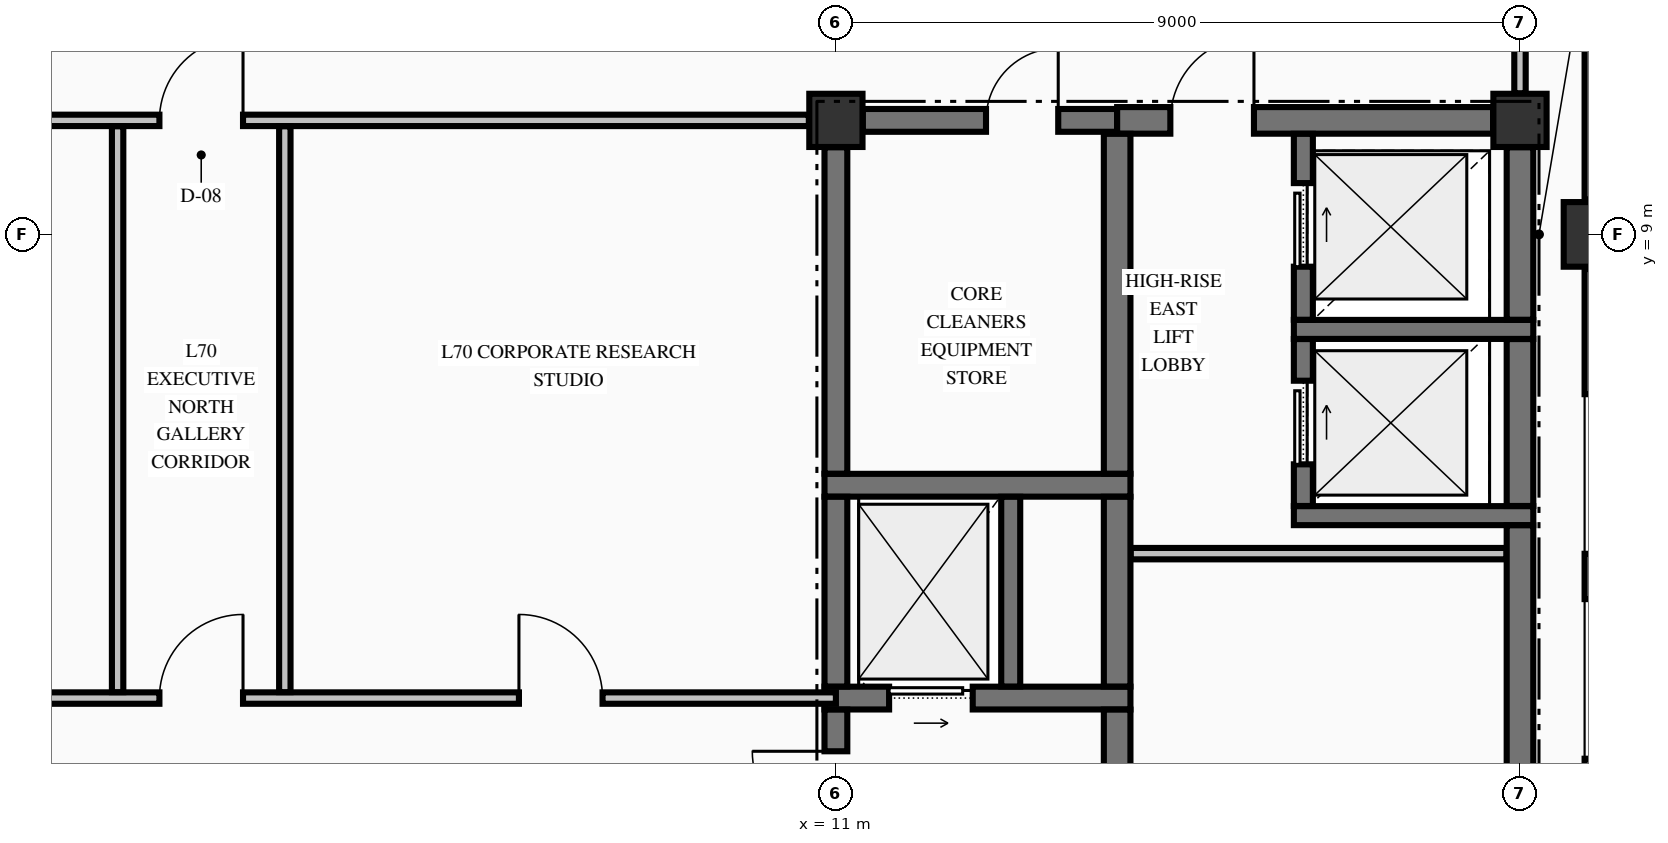
"""IFC4 building model, lengths in metres.
Left out: names, types, materials, properties, quantities, classifications, styles, units other than length and angle.
Written with IfcOpenShell. Run it as: python <this file> out.ifc"""

import sys

from ifc_helpers import new_model, si_unit, direction, frame, frame_2d, origin, origin_2d, place, context, subcontext, project, spatial, rectangle, extrude, element, fill, save


model = new_model("IFC4")
c1 = context("Model", 3, precision=1e-05, world=origin(), true_north=direction((0.0, 1.0)))
c2 = subcontext(c1, "Body", "Model", "MODEL_VIEW")
j1 = project(units=[si_unit("LENGTHUNIT", "METRE"), si_unit("PLANEANGLEUNIT", "RADIAN")], contexts=[c1])
p1 = place(None, origin())
s1 = spatial("IfcSite", under=j1, at=p1, CompositionType="ELEMENT")
p2 = place(p1, origin())
s2 = spatial("IfcBuilding", under=s1, at=p2, CompositionType="ELEMENT")
p3 = place(p2, frame((0.0, 0.0, 264.12)))
s3 = spatial("IfcBuildingStorey", under=s2, at=p3, CompositionType="ELEMENT", Elevation=264.12)
p4 = place(p3, frame((21.0, 9.0, -0.25), z_axis=(0.0, 0.0, 1.0), x_axis=(1.0, 0.0, 0.0)))
e1 = element("IfcColumn", 1, at=p4, inside=s3, PredefinedType="COLUMN", context=c2, shape_type="SweptSolid", body=[
    extrude(rectangle(XDim=0.85, YDim=0.85, at=origin_2d()), origin(), (0.0, 0.0, 1.0), 3.23),
])
for number, where, z_axis, x_axis in (
    (2, (11.0, 10.5, -0.25), (0.0, 0.0, 1.0), (1.0, 0.0, 0.0)),
    (3, (20.0, 10.5, -0.25), (0.0, 0.0, 1.0), (1.0, 0.0, 0.0)),
):
    element("IfcColumn", number, at=place(p3, frame(where, z_axis=z_axis, x_axis=x_axis)), inside=s3, PredefinedType="COLUMN", context=c2, shape_type="SweptSolid", body=[
        extrude(rectangle(XDim=0.7, YDim=0.7, at=origin_2d()), origin(), (0.0, 0.0, 1.0), 3.23),
    ])
p5 = place(p3, frame((21.0, 0.455, 0.0), z_axis=(0.0, 0.0, 1.0), x_axis=(0.0, 1.0, 0.0)))
e4 = element("IfcWall", 4, at=p5, inside=s3, PredefinedType="STANDARD", context=c2, shape_type="SweptSolid", body=[
    extrude(rectangle(XDim=8.09, YDim=0.3, at=frame_2d((4.045, 0.0))), origin(), (0.0, 0.0, 1.0), 2.372),
])
p6 = place(p5, frame((1.647, 0.0, 0.7)))
e5 = element("IfcOpeningElement", 5, at=p6, cuts=e4, PredefinedType="OPENING", context=c2, shape_type="SweptSolid", body=[
    extrude(rectangle(XDim=2.1, YDim=1.5, at=frame_2d((1.05, 0.75))), frame((0.0, 0.16, 0.0), z_axis=(0.0, -1.0, 0.0), x_axis=(1.0, 0.0, 0.0)), (0.0, 0.0, 1.0), 0.32),
])
p7 = place(p5, frame((4.343, 0.0, 0.7)))
e6 = element("IfcOpeningElement", 6, at=p7, cuts=e4, PredefinedType="OPENING", context=c2, shape_type="SweptSolid", body=[
    extrude(rectangle(XDim=2.1, YDim=1.5, at=frame_2d((1.05, 0.75))), frame((0.0, 0.16, 0.0), z_axis=(0.0, -1.0, 0.0), x_axis=(1.0, 0.0, 0.0)), (0.0, 0.0, 1.0), 0.32),
])
p8 = place(p3, frame((21.0, 9.455, 0.0), z_axis=(0.0, 0.0, 1.0), x_axis=(0.0, 1.0, 0.0)))
e7 = element("IfcWall", 7, at=p8, inside=s3, PredefinedType="STANDARD", context=c2, shape_type="SweptSolid", body=[
    extrude(rectangle(XDim=8.09, YDim=0.3, at=frame_2d((4.045, 0.0))), origin(), (0.0, 0.0, 1.0), 2.372),
])
p9 = place(p3, frame((10.85, 2.9, 0.0), z_axis=(0.0, 0.0, 1.0), x_axis=(1.0, 0.0, 0.0)))
e8 = element("IfcWall", 8, at=p9, inside=s3, PredefinedType="SHEAR", context=c2, shape_type="SweptSolid", body=[
    extrude(rectangle(XDim=4.025, YDim=0.3, at=frame_2d((2.012, 0.0))), origin(), (0.0, 0.0, 1.0), 2.98),
])
p10 = place(p9, frame((0.85, 0.0, 0.0)))
e9 = element("IfcOpeningElement", 9, at=p10, cuts=e8, PredefinedType="OPENING", context=c2, shape_type="SweptSolid", body=[
    extrude(rectangle(XDim=1.1, YDim=2.2, at=frame_2d((0.55, 1.1))), frame((0.0, 0.16, 0.0), z_axis=(0.0, -1.0, 0.0), x_axis=(1.0, 0.0, 0.0)), (0.0, 0.0, 1.0), 0.32),
])
p11 = place(p3, frame((17.025, 5.3, 0.0), z_axis=(0.0, 0.0, 1.0), x_axis=(1.0, 0.0, 0.0)))
e10 = element("IfcWall", 10, at=p11, inside=s3, PredefinedType="SOLIDWALL", context=c2, shape_type="SweptSolid", body=[
    extrude(rectangle(XDim=3.15, YDim=0.25, at=frame_2d((1.575, 0.0))), origin(), (0.0, 0.0, 1.0), 2.98),
])
p12 = place(p3, frame((10.85, 5.7, 0.0), z_axis=(0.0, 0.0, 1.0), x_axis=(1.0, 0.0, 0.0)))
e11 = element("IfcWall", 11, at=p12, inside=s3, PredefinedType="SHEAR", context=c2, shape_type="SweptSolid", body=[
    extrude(rectangle(XDim=4.025, YDim=0.3, at=frame_2d((2.012, 0.0))), origin(), (0.0, 0.0, 1.0), 2.98),
])
p13 = place(p3, frame((17.025, 7.75, 0.0), z_axis=(0.0, 0.0, 1.0), x_axis=(1.0, 0.0, 0.0)))
e12 = element("IfcWall", 12, at=p13, inside=s3, PredefinedType="SOLIDWALL", context=c2, shape_type="SweptSolid", body=[
    extrude(rectangle(XDim=3.15, YDim=0.25, at=frame_2d((1.575, 0.0))), origin(), (0.0, 0.0, 1.0), 2.98),
])
p14 = place(p3, frame((11.354, 10.5, 0.0), z_axis=(0.0, 0.0, 1.0), x_axis=(1.0, 0.0, 0.0)))
e13 = element("IfcWall", 13, at=p14, inside=s3, PredefinedType="SHEAR", context=c2, shape_type="SweptSolid", body=[
    extrude(rectangle(XDim=3.346, YDim=0.3, at=frame_2d((1.673, 0.0))), origin(), (0.0, 0.0, 1.0), 2.98),
])
p15 = place(p14, frame((1.621, 0.0, 0.0)))
e14 = element("IfcOpeningElement", 14, at=p15, cuts=e13, PredefinedType="OPENING", context=c2, shape_type="SweptSolid", body=[
    extrude(rectangle(XDim=0.95, YDim=2.15, at=frame_2d((0.475, 1.075))), frame((0.0, 0.16, 0.0), z_axis=(0.0, -1.0, 0.0), x_axis=(1.0, 0.0, 0.0)), (0.0, 0.0, 1.0), 0.32),
])
p16 = place(p3, frame((14.7, 10.5, 0.0), z_axis=(0.0, 0.0, 1.0), x_axis=(1.0, 0.0, 0.0)))
e15 = element("IfcWall", 15, at=p16, inside=s3, PredefinedType="SHEAR", context=c2, shape_type="SweptSolid", body=[
    extrude(rectangle(XDim=4.946, YDim=0.35, at=frame_2d((2.473, 0.0))), origin(), (0.0, 0.0, 1.0), 2.98),
])
p17 = place(p16, frame((0.7, 0.0, 0.0)))
e16 = element("IfcOpeningElement", 16, at=p17, cuts=e15, PredefinedType="OPENING", context=c2, shape_type="SweptSolid", body=[
    extrude(rectangle(XDim=1.1, YDim=2.15, at=frame_2d((0.55, 1.075))), frame((0.0, 0.185, 0.0), z_axis=(0.0, -1.0, 0.0), x_axis=(1.0, 0.0, 0.0)), (0.0, 0.0, 1.0), 0.37),
])
p18 = place(p3, frame((-11.0, 2.9, 0.0), z_axis=(0.0, 0.0, 1.0), x_axis=(1.0, 0.0, 0.0)))
e17 = element("IfcWall", 17, at=p18, inside=s3, PredefinedType="PARTITIONING", context=c2, shape_type="SweptSolid", body=[
    extrude(rectangle(XDim=22.0, YDim=0.15, at=frame_2d((11.0, 0.0))), origin(), (0.0, 0.0, 1.0), 2.98),
])
p19 = place(p18, frame((13.1, 0.0, 0.0)))
e18 = element("IfcOpeningElement", 18, at=p19, cuts=e17, PredefinedType="OPENING", context=c2, shape_type="SweptSolid", body=[
    extrude(rectangle(XDim=1.1, YDim=2.15, at=frame_2d((0.55, 1.075))), frame((0.0, 0.085, 0.0), z_axis=(0.0, -1.0, 0.0), x_axis=(1.0, 0.0, 0.0)), (0.0, 0.0, 1.0), 0.17),
])
p20 = place(p18, frame((5.755, 0.0, 0.0)))
e19 = element("IfcOpeningElement", 19, at=p20, cuts=e17, PredefinedType="OPENING", context=c2, shape_type="SweptSolid", body=[
    extrude(rectangle(XDim=1.05, YDim=2.15, at=frame_2d((0.525, 1.075))), frame((0.0, 0.085, 0.0), z_axis=(0.0, -1.0, 0.0), x_axis=(1.0, 0.0, 0.0)), (0.0, 0.0, 1.0), 0.17),
])
p21 = place(p18, frame((17.83, 0.0, 0.0)))
e20 = element("IfcOpeningElement", 20, at=p21, cuts=e17, PredefinedType="OPENING", context=c2, shape_type="SweptSolid", body=[
    extrude(rectangle(XDim=1.1, YDim=2.15, at=frame_2d((0.55, 1.075))), frame((0.0, 0.085, 0.0), z_axis=(0.0, -1.0, 0.0), x_axis=(1.0, 0.0, 0.0)), (0.0, 0.0, 1.0), 0.17),
])
p22 = place(p3, frame((14.878, 4.8, 0.0), z_axis=(0.0, 0.0, 1.0), x_axis=(1.0, 0.0, 0.0)))
e21 = element("IfcWall", 21, at=p22, inside=s3, PredefinedType="PARTITIONING", context=c2, shape_type="SweptSolid", body=[
    extrude(rectangle(XDim=4.944, YDim=0.15, at=frame_2d((2.472, 0.0))), origin(), (0.0, 0.0, 1.0), 2.98),
])
p23 = place(p3, frame((-10.644, 10.5, 0.0), z_axis=(0.0, 0.0, 1.0), x_axis=(1.0, 0.0, 0.0)))
e22 = element("IfcWall", 22, at=p23, inside=s3, PredefinedType="PARTITIONING", context=c2, shape_type="SweptSolid", body=[
    extrude(rectangle(XDim=21.288, YDim=0.15, at=frame_2d((10.644, 0.0))), origin(), (0.0, 0.0, 1.0), 2.98),
])
p24 = place(p23, frame((12.744, 0.0, 0.0)))
e23 = element("IfcOpeningElement", 23, at=p24, cuts=e22, PredefinedType="OPENING", context=c2, shape_type="SweptSolid", body=[
    extrude(rectangle(XDim=1.1, YDim=2.15, at=frame_2d((0.55, 1.075))), frame((0.0, 0.085, 0.0), z_axis=(0.0, -1.0, 0.0), x_axis=(1.0, 0.0, 0.0)), (0.0, 0.0, 1.0), 0.17),
])
p25 = place(p3, frame((11.0, 0.354, 0.0), z_axis=(0.0, 0.0, 1.0), x_axis=(0.0, 1.0, 0.0)))
e24 = element("IfcWall", 24, at=p25, inside=s3, PredefinedType="SHEAR", context=c2, shape_type="SweptSolid", body=[
    extrude(rectangle(XDim=2.394, YDim=0.3, at=frame_2d((1.197, 0.0))), origin(), (0.0, 0.0, 1.0), 2.98),
])
p26 = place(p25, frame((0.746, 0.0, 0.0)))
e25 = element("IfcOpeningElement", 25, at=p26, cuts=e24, PredefinedType="OPENING", context=c2, shape_type="SweptSolid", body=[
    extrude(rectangle(XDim=1.1, YDim=2.15, at=frame_2d((0.55, 1.075))), frame((0.0, 0.16, 0.0), z_axis=(0.0, -1.0, 0.0), x_axis=(1.0, 0.0, 0.0)), (0.0, 0.0, 1.0), 0.32),
])
p27 = place(p3, frame((11.0, 3.052, 0.0), z_axis=(0.0, 0.0, 1.0), x_axis=(0.0, 1.0, 0.0)))
e26 = element("IfcWall", 26, at=p27, inside=s3, PredefinedType="SHEAR", context=c2, shape_type="SweptSolid", body=[
    extrude(rectangle(XDim=2.496, YDim=0.3, at=frame_2d((1.248, 0.0))), origin(), (0.0, 0.0, 1.0), 2.98),
])
p28 = place(p3, frame((11.0, 5.852, 0.0), z_axis=(0.0, 0.0, 1.0), x_axis=(0.0, 1.0, 0.0)))
e27 = element("IfcWall", 27, at=p28, inside=s3, PredefinedType="SHEAR", context=c2, shape_type="SweptSolid", body=[
    extrude(rectangle(XDim=4.294, YDim=0.3, at=frame_2d((2.147, 0.0))), origin(), (0.0, 0.0, 1.0), 2.98),
])
p29 = place(p3, frame((13.3, 3.052, 0.0), z_axis=(0.0, 0.0, 1.0), x_axis=(0.0, 1.0, 0.0)))
e28 = element("IfcWall", 28, at=p29, inside=s3, PredefinedType="SOLIDWALL", context=c2, shape_type="SweptSolid", body=[
    extrude(rectangle(XDim=2.496, YDim=0.25, at=frame_2d((1.248, 0.0))), origin(), (0.0, 0.0, 1.0), 2.98),
])
p30 = place(p3, frame((14.7, -0.098, 0.0), z_axis=(0.0, 0.0, 1.0), x_axis=(0.0, 1.0, 0.0)))
e29 = element("IfcWall", 29, at=p30, inside=s3, PredefinedType="SHEAR", context=c2, shape_type="SweptSolid", body=[
    extrude(rectangle(XDim=2.846, YDim=0.35, at=frame_2d((1.423, 0.0))), origin(), (0.0, 0.0, 1.0), 2.98),
])
p31 = place(p3, frame((14.7, 3.052, 0.0), z_axis=(0.0, 0.0, 1.0), x_axis=(0.0, 1.0, 0.0)))
e30 = element("IfcWall", 30, at=p31, inside=s3, PredefinedType="SHEAR", context=c2, shape_type="SweptSolid", body=[
    extrude(rectangle(XDim=2.496, YDim=0.35, at=frame_2d((1.248, 0.0))), origin(), (0.0, 0.0, 1.0), 2.98),
])
p32 = place(p3, frame((14.7, 5.852, 0.0), z_axis=(0.0, 0.0, 1.0), x_axis=(0.0, 1.0, 0.0)))
e31 = element("IfcWall", 31, at=p32, inside=s3, PredefinedType="SHEAR", context=c2, shape_type="SweptSolid", body=[
    extrude(rectangle(XDim=4.471, YDim=0.35, at=frame_2d((2.235, 0.0))), origin(), (0.0, 0.0, 1.0), 2.98),
])
p33 = place(p3, frame((17.15, 5.427, 0.0), z_axis=(0.0, 0.0, 1.0), x_axis=(0.0, 1.0, 0.0)))
e32 = element("IfcWall", 32, at=p33, inside=s3, PredefinedType="SOLIDWALL", context=c2, shape_type="SweptSolid", body=[
    extrude(rectangle(XDim=2.196, YDim=0.25, at=frame_2d((1.098, 0.0))), origin(), (0.0, 0.0, 1.0), 2.98),
])
p34 = place(p33, frame((0.548, 0.0, 0.0)))
e33 = element("IfcOpeningElement", 33, at=p34, cuts=e32, PredefinedType="OPENING", context=c2, shape_type="SweptSolid", body=[
    extrude(rectangle(XDim=1.1, YDim=2.2, at=frame_2d((0.55, 1.1))), frame((0.0, 0.135, 0.0), z_axis=(0.0, -1.0, 0.0), x_axis=(1.0, 0.0, 0.0)), (0.0, 0.0, 1.0), 0.27),
])
p35 = place(p3, frame((17.15, 7.877, 0.0), z_axis=(0.0, 0.0, 1.0), x_axis=(0.0, 1.0, 0.0)))
e34 = element("IfcWall", 34, at=p35, inside=s3, PredefinedType="SOLIDWALL", context=c2, shape_type="SweptSolid", body=[
    extrude(rectangle(XDim=2.446, YDim=0.25, at=frame_2d((1.223, 0.0))), origin(), (0.0, 0.0, 1.0), 2.98),
])
p36 = place(p35, frame((0.698, 0.0, 0.0)))
e35 = element("IfcOpeningElement", 35, at=p36, cuts=e34, PredefinedType="OPENING", context=c2, shape_type="SweptSolid", body=[
    extrude(rectangle(XDim=1.1, YDim=2.2, at=frame_2d((0.55, 1.1))), frame((0.0, 0.135, 0.0), z_axis=(0.0, -1.0, 0.0), x_axis=(1.0, 0.0, 0.0)), (0.0, 0.0, 1.0), 0.27),
])
p37 = place(p3, frame((20.0, -9.596, 0.0), z_axis=(0.0, 0.0, 1.0), x_axis=(0.0, 1.0, 0.0)))
e36 = element("IfcWall", 36, at=p37, inside=s3, PredefinedType="SHEAR", context=c2, shape_type="SweptSolid", body=[
    extrude(rectangle(XDim=14.769, YDim=0.35, at=frame_2d((7.385, 0.0))), origin(), (0.0, 0.0, 1.0), 2.98),
])
p38 = place(p3, frame((20.0, 5.427, 0.0), z_axis=(0.0, 0.0, 1.0), x_axis=(0.0, 1.0, 0.0)))
e37 = element("IfcWall", 37, at=p38, inside=s3, PredefinedType="SHEAR", context=c2, shape_type="SweptSolid", body=[
    extrude(rectangle(XDim=2.196, YDim=0.35, at=frame_2d((1.098, 0.0))), origin(), (0.0, 0.0, 1.0), 2.98),
])
p39 = place(p3, frame((20.0, 7.877, 0.0), z_axis=(0.0, 0.0, 1.0), x_axis=(0.0, 1.0, 0.0)))
e38 = element("IfcWall", 38, at=p39, inside=s3, PredefinedType="SHEAR", context=c2, shape_type="SweptSolid", body=[
    extrude(rectangle(XDim=2.269, YDim=0.35, at=frame_2d((1.135, 0.0))), origin(), (0.0, 0.0, 1.0), 2.98),
])
for number, where, z_axis, x_axis in (
    (39, (1.55, 2.978, 0.0), (0.0, 0.0, 1.0), (0.0, 1.0, 0.0)),
    (40, (3.75, 2.978, 0.0), (0.0, 0.0, 1.0), (0.0, 1.0, 0.0)),
):
    element("IfcWall", number, at=place(p3, frame(where, z_axis=z_axis, x_axis=x_axis)), inside=s3, PredefinedType="PARTITIONING", context=c2, shape_type="SweptSolid", body=[
        extrude(rectangle(XDim=7.444, YDim=0.15, at=frame_2d((3.722, 0.0))), origin(), (0.0, 0.0, 1.0), 2.98),
    ])
p40 = place(p3, frame((20.0, 10.856, 0.0), z_axis=(0.0, 0.0, 1.0), x_axis=(0.0, 1.0, 0.0)))
e41 = element("IfcWall", 41, at=p40, inside=s3, PredefinedType="PARTITIONING", context=c2, shape_type="SweptSolid", body=[
    extrude(rectangle(XDim=1.816, YDim=0.15, at=frame_2d((0.908, 0.0))), origin(), (0.0, 0.0, 1.0), 2.57),
])
p41 = place(p26, origin())
e42 = element("IfcDoor", 42, at=p41, inside=s3, OperationType="SINGLE_SWING_RIGHT", PredefinedType="DOOR", context=c2, shape_type="SweptSolid", body=[
    extrude(rectangle(XDim=1.1, YDim=2.15, at=frame_2d((0.55, 1.075))), frame((0.0, 0.025, 0.0), z_axis=(0.0, -1.0, 0.0), x_axis=(1.0, 0.0, 0.0)), (0.0, 0.0, 1.0), 0.05),
])
fill(e25, e42)
p42 = place(p10, origin())
e43 = element("IfcDoor", 43, at=p42, inside=s3, OperationType="SLIDING_TO_RIGHT", PredefinedType="DOOR", context=c2, shape_type="SweptSolid", body=[
    extrude(rectangle(XDim=1.1, YDim=2.2, at=frame_2d((0.55, 1.1))), frame((0.0, 0.025, 0.0), z_axis=(0.0, -1.0, 0.0), x_axis=(1.0, 0.0, 0.0)), (0.0, 0.0, 1.0), 0.05),
])
fill(e9, e43)
p43 = place(p15, origin())
e44 = element("IfcDoor", 44, at=p43, inside=s3, OperationType="SINGLE_SWING_RIGHT", PredefinedType="DOOR", context=c2, shape_type="SweptSolid", body=[
    extrude(rectangle(XDim=0.95, YDim=2.15, at=frame_2d((0.475, 1.075))), frame((0.0, 0.025, 0.0), z_axis=(0.0, -1.0, 0.0), x_axis=(1.0, 0.0, 0.0)), (0.0, 0.0, 1.0), 0.05),
])
fill(e14, e44)
p44 = place(p34, origin())
e45 = element("IfcDoor", 45, at=p44, inside=s3, OperationType="SLIDING_TO_RIGHT", PredefinedType="DOOR", context=c2, shape_type="SweptSolid", body=[
    extrude(rectangle(XDim=1.1, YDim=2.2, at=frame_2d((0.55, 1.1))), frame((0.0, 0.025, 0.0), z_axis=(0.0, -1.0, 0.0), x_axis=(1.0, 0.0, 0.0)), (0.0, 0.0, 1.0), 0.05),
])
fill(e33, e45)
p45 = place(p36, origin())
e46 = element("IfcDoor", 46, at=p45, inside=s3, OperationType="SLIDING_TO_RIGHT", PredefinedType="DOOR", context=c2, shape_type="SweptSolid", body=[
    extrude(rectangle(XDim=1.1, YDim=2.2, at=frame_2d((0.55, 1.1))), frame((0.0, 0.025, 0.0), z_axis=(0.0, -1.0, 0.0), x_axis=(1.0, 0.0, 0.0)), (0.0, 0.0, 1.0), 0.05),
])
fill(e35, e46)
p46 = place(p17, origin())
e47 = element("IfcDoor", 47, at=p46, inside=s3, OperationType="SINGLE_SWING_RIGHT", PredefinedType="DOOR", context=c2, shape_type="SweptSolid", body=[
    extrude(rectangle(XDim=1.1, YDim=2.15, at=frame_2d((0.55, 1.075))), frame((0.0, 0.025, 0.0), z_axis=(0.0, -1.0, 0.0), x_axis=(1.0, 0.0, 0.0)), (0.0, 0.0, 1.0), 0.05),
])
fill(e16, e47)
p47 = place(p24, origin())
e48 = element("IfcDoor", 48, at=p47, inside=s3, OperationType="SINGLE_SWING_RIGHT", PredefinedType="DOOR", context=c2, shape_type="SweptSolid", body=[
    extrude(rectangle(XDim=1.1, YDim=2.15, at=frame_2d((0.55, 1.075))), frame((0.0, 0.025, 0.0), z_axis=(0.0, -1.0, 0.0), x_axis=(1.0, 0.0, 0.0)), (0.0, 0.0, 1.0), 0.05),
])
fill(e23, e48)
p48 = place(p19, origin())
e49 = element("IfcDoor", 49, at=p48, inside=s3, OperationType="SINGLE_SWING_RIGHT", PredefinedType="DOOR", context=c2, shape_type="SweptSolid", body=[
    extrude(rectangle(XDim=1.1, YDim=2.15, at=frame_2d((0.55, 1.075))), frame((0.0, 0.025, 0.0), z_axis=(0.0, -1.0, 0.0), x_axis=(1.0, 0.0, 0.0)), (0.0, 0.0, 1.0), 0.05),
])
fill(e18, e49)
p49 = place(p21, origin())
e50 = element("IfcDoor", 50, at=p49, inside=s3, OperationType="SINGLE_SWING_LEFT", PredefinedType="DOOR", context=c2, shape_type="SweptSolid", body=[
    extrude(rectangle(XDim=1.1, YDim=2.15, at=frame_2d((0.55, 1.075))), frame((0.0, 0.025, 0.0), z_axis=(0.0, -1.0, 0.0), x_axis=(1.0, 0.0, 0.0)), (0.0, 0.0, 1.0), 0.05),
])
fill(e20, e50)
save(model, sys.argv[1])
